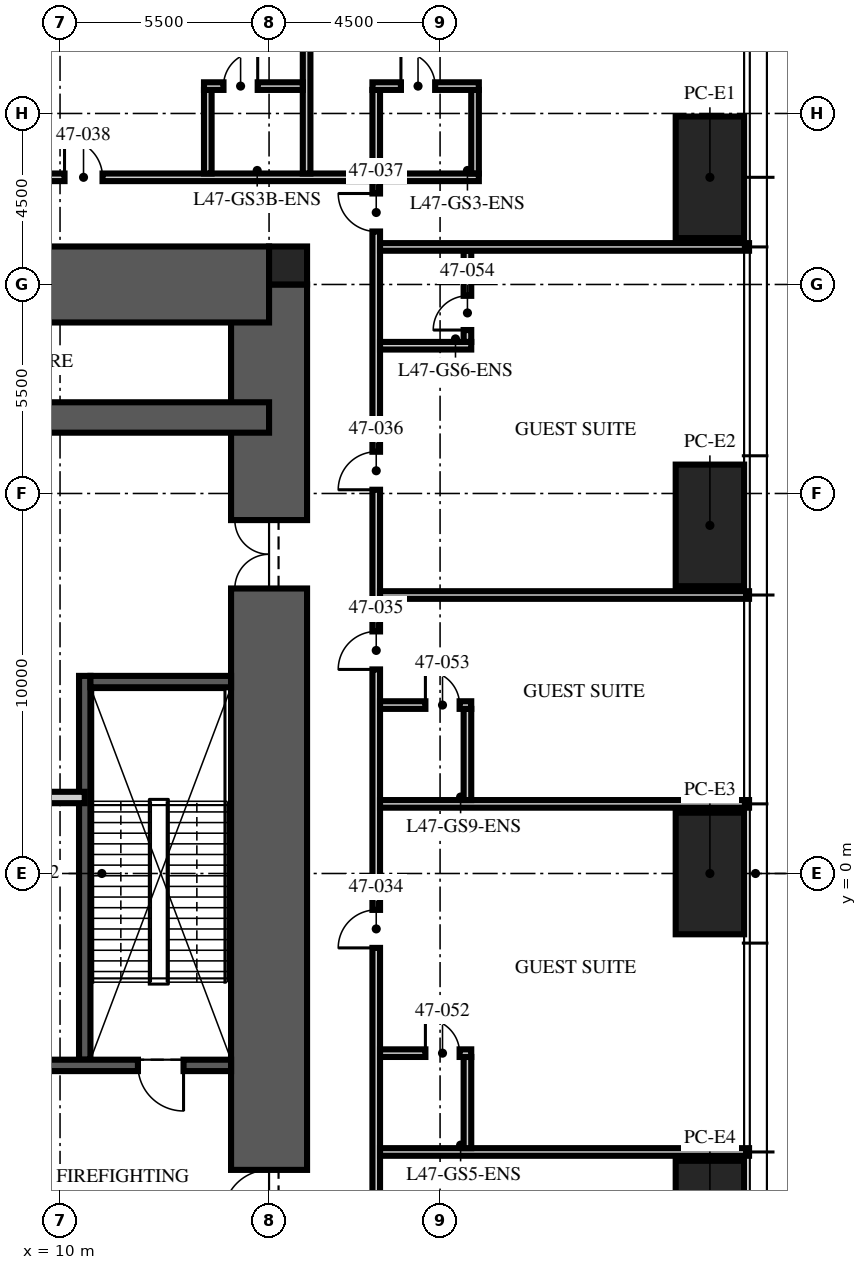
"""IFC4 building model, lengths in metres.
Left out: names, types, materials, properties, quantities, classifications, styles, units other than length and angle.
Written with IfcOpenShell. Run it as: python <this file> out.ifc"""

import sys

from ifc_helpers import new_model, si_unit, direction, frame, frame_2d, origin, origin_2d, place, context, subcontext, project, spatial, rectangle, hollow_rectangle, extrude, element, fill, save


model = new_model("IFC4")
c1 = context("Model", 3, precision=1e-05, world=origin(), true_north=direction((0.0, 1.0)))
c2 = subcontext(c1, "Body", "Model", "MODEL_VIEW")
j1 = project(units=[si_unit("LENGTHUNIT", "METRE"), si_unit("PLANEANGLEUNIT", "RADIAN")], contexts=[c1])
p1 = place(None, origin())
s1 = spatial("IfcSite", under=j1, at=p1, CompositionType="ELEMENT")
p2 = place(p1, origin())
s2 = spatial("IfcBuilding", under=s1, at=p2, CompositionType="ELEMENT")
p3 = place(p2, frame((0.0, 0.0, 186.0)))
s3 = spatial("IfcBuildingStorey", under=s2, at=p3, CompositionType="ELEMENT", Elevation=186.0)
p4 = place(p3, frame((15.5, -15.5, -0.3), z_axis=(0.0, 0.0, 1.0), x_axis=(0.0, 1.0, 0.0)))
e1 = element("IfcWall", 1, at=p4, inside=s3, PredefinedType="SHEAR", context=c2, shape_type="SweptSolid", body=[
    extrude(rectangle(XDim=31.0, YDim=2.0, at=frame_2d((15.5, 0.0))), origin(), (0.0, 0.0, 1.0), 5.95),
])
p5 = place(p4, frame((6.5, 0.0, 0.3)))
e2 = element("IfcOpeningElement", 2, at=p5, cuts=e1, PredefinedType="OPENING", context=c2, shape_type="SweptSolid", body=[
    extrude(rectangle(XDim=1.2, YDim=2.1, at=frame_2d((0.6, 1.05))), frame((0.0, 1.01, 0.0), z_axis=(0.0, -1.0, 0.0), x_axis=(1.0, 0.0, 0.0)), (0.0, 0.0, 1.0), 2.02),
])
p6 = place(p4, frame((23.0, 0.0, 0.3)))
e3 = element("IfcOpeningElement", 3, at=p6, cuts=e1, PredefinedType="OPENING", context=c2, shape_type="SweptSolid", body=[
    extrude(rectangle(XDim=1.8, YDim=2.1, at=frame_2d((0.9, 1.05))), frame((0.0, 1.01, 0.0), z_axis=(0.0, -1.0, 0.0), x_axis=(1.0, 0.0, 0.0)), (0.0, 0.0, 1.0), 2.02),
])
p7 = place(p3, frame((-15.5, 15.5, -0.3), z_axis=(0.0, 0.0, 1.0), x_axis=(1.0, 0.0, 0.0)))
e4 = element("IfcWall", 4, at=p7, inside=s3, PredefinedType="SHEAR", context=c2, shape_type="SweptSolid", body=[
    extrude(rectangle(XDim=31.0, YDim=2.0, at=frame_2d((15.5, 0.0))), origin(), (0.0, 0.0, 1.0), 5.95),
])
p8 = place(p7, frame((5.0, 0.0, 0.3)))
e5 = element("IfcOpeningElement", 5, at=p8, cuts=e4, PredefinedType="OPENING", context=c2, shape_type="SweptSolid", body=[
    extrude(rectangle(XDim=1.0, YDim=2.1, at=frame_2d((0.5, 1.05))), frame((0.0, 1.01, 0.0), z_axis=(0.0, -1.0, 0.0), x_axis=(1.0, 0.0, 0.0)), (0.0, 0.0, 1.0), 2.02),
])
p9 = place(p3, frame((-15.5, 12.0, -0.3), z_axis=(0.0, 0.0, 1.0), x_axis=(1.0, 0.0, 0.0)))
e6 = element("IfcWall", 6, at=p9, inside=s3, PredefinedType="SHEAR", context=c2, shape_type="SweptSolid", body=[
    extrude(rectangle(XDim=31.0, YDim=0.8, at=frame_2d((15.5, 0.0))), origin(), (0.0, 0.0, 1.0), 5.95),
])
p10 = place(p3, frame((16.0, 16.0, -0.3), z_axis=(0.0, 0.0, 1.0), x_axis=(1.0, 0.0, 0.0)))
e7 = element("IfcColumn", 7, at=p10, inside=s3, PredefinedType="COLUMN", context=c2, shape_type="SweptSolid", body=[
    extrude(rectangle(XDim=1.0, YDim=1.0, at=origin_2d()), origin(), (0.0, 0.0, 1.0), 5.95),
])
p11 = place(p3, frame((27.1, 18.32, 0.0), z_axis=(0.0, 0.0, 1.0), x_axis=(0.0, 1.0, 0.0)))
e8 = element("IfcColumn", 8, at=p11, inside=s3, PredefinedType="COLUMN", context=c2, shape_type="SweptSolid", body=[
    extrude(hollow_rectangle(XDim=3.2, YDim=1.8, WallThickness=0.2, at=origin_2d()), origin(), (0.0, 0.0, 1.0), 4.72),
])
p12 = place(p3, frame((27.1, 9.16, 0.0), z_axis=(0.0, 0.0, 1.0), x_axis=(0.0, 1.0, 0.0)))
e9 = element("IfcColumn", 9, at=p12, inside=s3, PredefinedType="COLUMN", context=c2, shape_type="SweptSolid", body=[
    extrude(hollow_rectangle(XDim=3.2, YDim=1.8, WallThickness=0.2, at=origin_2d()), origin(), (0.0, 0.0, 1.0), 4.87),
])
p13 = place(p3, frame((27.1, 0.0, 0.0), z_axis=(0.0, 0.0, 1.0), x_axis=(0.0, 1.0, 0.0)))
e10 = element("IfcColumn", 10, at=p13, inside=s3, PredefinedType="COLUMN", context=c2, shape_type="SweptSolid", body=[
    extrude(hollow_rectangle(XDim=3.2, YDim=1.8, WallThickness=0.2, at=origin_2d()), origin(), (0.0, 0.0, 1.0), 5.03),
])
p14 = place(p3, frame((27.1, -9.16, 0.0), z_axis=(0.0, 0.0, 1.0), x_axis=(0.0, 1.0, 0.0)))
e11 = element("IfcColumn", 11, at=p14, inside=s3, PredefinedType="COLUMN", context=c2, shape_type="SweptSolid", body=[
    extrude(hollow_rectangle(XDim=3.2, YDim=1.8, WallThickness=0.2, at=origin_2d()), origin(), (0.0, 0.0, 1.0), 4.87),
])
p15 = place(p3, frame((10.65, -4.9, 0.0), z_axis=(0.0, 0.0, 1.0), x_axis=(0.0, 1.0, 0.0)))
e12 = element("IfcWall", 12, at=p15, inside=s3, PredefinedType="SOLIDWALL", context=c2, shape_type="SweptSolid", body=[
    extrude(rectangle(XDim=10.1, YDim=0.3, at=frame_2d((5.05, 0.0))), origin(), (0.0, 0.0, 1.0), 5.65),
])
p16 = place(p3, frame((14.5, -5.05, 0.0), z_axis=(0.0, 0.0, 1.0), x_axis=(-1.0, 0.0, 0.0)))
e13 = element("IfcWall", 13, at=p16, inside=s3, PredefinedType="SOLIDWALL", context=c2, shape_type="SweptSolid", body=[
    extrude(rectangle(XDim=5.7, YDim=0.3, at=frame_2d((2.85, 0.0))), origin(), (0.0, 0.0, 1.0), 5.65),
])
p17 = place(p16, frame((1.25, 0.0, 0.0)))
e14 = element("IfcOpeningElement", 14, at=p17, cuts=e13, PredefinedType="OPENING", context=c2, shape_type="SweptSolid", body=[
    extrude(rectangle(XDim=1.2, YDim=2.1, at=frame_2d((0.6, 1.05))), frame((0.0, 0.16, 0.0), z_axis=(0.0, -1.0, 0.0), x_axis=(1.0, 0.0, 0.0)), (0.0, 0.0, 1.0), 0.32),
])
p18 = place(p3, frame((14.5, 5.05, 0.0), z_axis=(0.0, 0.0, 1.0), x_axis=(-1.0, 0.0, 0.0)))
e15 = element("IfcWall", 15, at=p18, inside=s3, PredefinedType="SOLIDWALL", context=c2, shape_type="SweptSolid", body=[
    extrude(rectangle(XDim=3.7, YDim=0.3, at=frame_2d((1.85, 0.0))), origin(), (0.0, 0.0, 1.0), 5.65),
])
p19 = place(p3, frame((-10.65, 2.0, 0.0), z_axis=(0.0, 0.0, 1.0), x_axis=(1.0, 0.0, 0.0)))
e16 = element("IfcWall", 16, at=p19, inside=s3, PredefinedType="PARTITIONING", context=c2, shape_type="SweptSolid", body=[
    extrude(rectangle(XDim=21.3, YDim=0.3, at=frame_2d((10.65, 0.0))), origin(), (0.0, 0.0, 1.0), 5.65),
])
p20 = place(p19, frame((10.05, 0.0, 0.0)))
e17 = element("IfcOpeningElement", 17, at=p20, cuts=e16, PredefinedType="OPENING", context=c2, shape_type="SweptSolid", body=[
    extrude(rectangle(XDim=1.2, YDim=2.1, at=frame_2d((0.6, 1.05))), frame((0.0, 0.16, 0.0), z_axis=(0.0, -1.0, 0.0), x_axis=(1.0, 0.0, 0.0)), (0.0, 0.0, 1.0), 0.32),
])
p21 = place(p19, frame((18.942, 0.0, 0.0)))
e18 = element("IfcOpeningElement", 18, at=p21, cuts=e16, PredefinedType="OPENING", context=c2, shape_type="SweptSolid", body=[
    extrude(rectangle(XDim=0.9, YDim=2.1, at=frame_2d((0.45, 1.05))), frame((0.0, 0.16, 0.0), z_axis=(0.0, -1.0, 0.0), x_axis=(1.0, 0.0, 0.0)), (0.0, 0.0, 1.0), 0.32),
])
p22 = place(p3, frame((18.32, -18.22, 0.0), z_axis=(0.0, 0.0, 1.0), x_axis=(0.0, 1.0, 0.0)))
e19 = element("IfcWall", 19, at=p22, inside=s3, PredefinedType="SOLIDWALL", context=c2, shape_type="SweptSolid", body=[
    extrude(rectangle(XDim=36.44, YDim=0.2, at=frame_2d((18.22, 0.0))), origin(), (0.0, 0.0, 1.0), 4.45),
])
p23 = place(p22, frame((7.102, 0.0, 0.0)))
e20 = element("IfcOpeningElement", 20, at=p23, cuts=e19, PredefinedType="OPENING", context=c2, shape_type="SweptSolid", body=[
    extrude(rectangle(XDim=1.0, YDim=2.1, at=frame_2d((0.5, 1.05))), frame((0.0, 0.11, 0.0), z_axis=(0.0, -1.0, 0.0), x_axis=(1.0, 0.0, 0.0)), (0.0, 0.0, 1.0), 0.22),
])
p24 = place(p22, frame((16.262, 0.0, 0.0)))
e21 = element("IfcOpeningElement", 21, at=p24, cuts=e19, PredefinedType="OPENING", context=c2, shape_type="SweptSolid", body=[
    extrude(rectangle(XDim=1.0, YDim=2.1, at=frame_2d((0.5, 1.05))), frame((0.0, 0.11, 0.0), z_axis=(0.0, -1.0, 0.0), x_axis=(1.0, 0.0, 0.0)), (0.0, 0.0, 1.0), 0.22),
])
p25 = place(p22, frame((23.59, 0.0, 0.0)))
e22 = element("IfcOpeningElement", 22, at=p25, cuts=e19, PredefinedType="OPENING", context=c2, shape_type="SweptSolid", body=[
    extrude(rectangle(XDim=1.0, YDim=2.1, at=frame_2d((0.5, 1.05))), frame((0.0, 0.11, 0.0), z_axis=(0.0, -1.0, 0.0), x_axis=(1.0, 0.0, 0.0)), (0.0, 0.0, 1.0), 0.22),
])
p26 = place(p22, frame((28.318, 0.0, 0.0)))
e23 = element("IfcOpeningElement", 23, at=p26, cuts=e19, PredefinedType="OPENING", context=c2, shape_type="SweptSolid", body=[
    extrude(rectangle(XDim=1.0, YDim=2.1, at=frame_2d((0.5, 1.05))), frame((0.0, 0.11, 0.0), z_axis=(0.0, -1.0, 0.0), x_axis=(1.0, 0.0, 0.0)), (0.0, 0.0, 1.0), 0.22),
])
p27 = place(p22, frame((35.114, 0.0, 0.0)))
e24 = element("IfcOpeningElement", 24, at=p27, cuts=e19, PredefinedType="OPENING", context=c2, shape_type="SweptSolid", body=[
    extrude(rectangle(XDim=1.0, YDim=2.1, at=frame_2d((0.5, 1.05))), frame((0.0, 0.11, 0.0), z_axis=(0.0, -1.0, 0.0), x_axis=(1.0, 0.0, 0.0)), (0.0, 0.0, 1.0), 0.22),
])
p28 = place(p3, frame((18.42, -7.328, 0.0), z_axis=(0.0, 0.0, 1.0), x_axis=(1.0, 0.0, 0.0)))
e25 = element("IfcWall", 25, at=p28, inside=s3, PredefinedType="SOLIDWALL", context=c2, shape_type="SweptSolid", body=[
    extrude(rectangle(XDim=9.71, YDim=0.2, at=frame_2d((4.855, 0.0))), origin(), (0.0, 0.0, 1.0), 4.95),
])
p29 = place(p3, frame((20.72, -7.228, 0.0), z_axis=(0.0, 0.0, 1.0), x_axis=(0.0, 1.0, 0.0)))
e26 = element("IfcWall", 26, at=p29, inside=s3, PredefinedType="SOLIDWALL", context=c2, shape_type="SweptSolid", body=[
    extrude(rectangle(XDim=2.4, YDim=0.2, at=frame_2d((1.2, 0.0))), origin(), (0.0, 0.0, 1.0), 5.65),
])
p30 = place(p3, frame((18.42, -4.728, 0.0), z_axis=(0.0, 0.0, 1.0), x_axis=(1.0, 0.0, 0.0)))
e27 = element("IfcWall", 27, at=p30, inside=s3, PredefinedType="SOLIDWALL", context=c2, shape_type="SweptSolid", body=[
    extrude(rectangle(XDim=2.4, YDim=0.2, at=frame_2d((1.2, 0.0))), origin(), (0.0, 0.0, 1.0), 4.45),
])
p31 = place(p30, frame((1.194, 0.0, 0.0)))
e28 = element("IfcOpeningElement", 28, at=p31, cuts=e27, PredefinedType="OPENING", context=c2, shape_type="SweptSolid", body=[
    extrude(rectangle(XDim=0.9, YDim=2.1, at=frame_2d((0.45, 1.05))), frame((0.0, 0.11, 0.0), z_axis=(0.0, -1.0, 0.0), x_axis=(1.0, 0.0, 0.0)), (0.0, 0.0, 1.0), 0.22),
])
p32 = place(p3, frame((18.42, 1.832, 0.0), z_axis=(0.0, 0.0, 1.0), x_axis=(1.0, 0.0, 0.0)))
e29 = element("IfcWall", 29, at=p32, inside=s3, PredefinedType="SOLIDWALL", context=c2, shape_type="SweptSolid", body=[
    extrude(rectangle(XDim=9.71, YDim=0.2, at=frame_2d((4.855, 0.0))), origin(), (0.0, 0.0, 1.0), 4.95),
])
p33 = place(p3, frame((20.72, 1.932, 0.0), z_axis=(0.0, 0.0, 1.0), x_axis=(0.0, 1.0, 0.0)))
e30 = element("IfcWall", 30, at=p33, inside=s3, PredefinedType="SOLIDWALL", context=c2, shape_type="SweptSolid", body=[
    extrude(rectangle(XDim=2.4, YDim=0.2, at=frame_2d((1.2, 0.0))), origin(), (0.0, 0.0, 1.0), 5.65),
])
p34 = place(p3, frame((18.42, 4.432, 0.0), z_axis=(0.0, 0.0, 1.0), x_axis=(1.0, 0.0, 0.0)))
e31 = element("IfcWall", 31, at=p34, inside=s3, PredefinedType="SOLIDWALL", context=c2, shape_type="SweptSolid", body=[
    extrude(rectangle(XDim=2.4, YDim=0.2, at=frame_2d((1.2, 0.0))), origin(), (0.0, 0.0, 1.0), 4.45),
])
p35 = place(p34, frame((1.194, 0.0, 0.0)))
e32 = element("IfcOpeningElement", 32, at=p35, cuts=e31, PredefinedType="OPENING", context=c2, shape_type="SweptSolid", body=[
    extrude(rectangle(XDim=0.9, YDim=2.1, at=frame_2d((0.45, 1.05))), frame((0.0, 0.11, 0.0), z_axis=(0.0, -1.0, 0.0), x_axis=(1.0, 0.0, 0.0)), (0.0, 0.0, 1.0), 0.22),
])
p36 = place(p3, frame((18.42, 7.328, 0.0), z_axis=(0.0, 0.0, 1.0), x_axis=(1.0, 0.0, 0.0)))
e33 = element("IfcWall", 33, at=p36, inside=s3, PredefinedType="SOLIDWALL", context=c2, shape_type="SweptSolid", body=[
    extrude(rectangle(XDim=9.71, YDim=0.2, at=frame_2d((4.855, 0.0))), origin(), (0.0, 0.0, 1.0), 4.95),
])
p37 = place(p3, frame((18.42, 13.888, 0.0), z_axis=(0.0, 0.0, 1.0), x_axis=(1.0, 0.0, 0.0)))
e34 = element("IfcWall", 34, at=p37, inside=s3, PredefinedType="SOLIDWALL", context=c2, shape_type="SweptSolid", body=[
    extrude(rectangle(XDim=2.4, YDim=0.2, at=frame_2d((1.2, 0.0))), origin(), (0.0, 0.0, 1.0), 4.45),
])
p38 = place(p3, frame((20.72, 13.988, 0.0), z_axis=(0.0, 0.0, 1.0), x_axis=(0.0, 1.0, 0.0)))
e35 = element("IfcWall", 35, at=p38, inside=s3, PredefinedType="SOLIDWALL", context=c2, shape_type="SweptSolid", body=[
    extrude(rectangle(XDim=2.4, YDim=0.2, at=frame_2d((1.2, 0.0))), origin(), (0.0, 0.0, 1.0), 5.65),
])
p39 = place(p38, frame((0.313, 0.0, 0.0)))
e36 = element("IfcOpeningElement", 36, at=p39, cuts=e35, PredefinedType="OPENING", context=c2, shape_type="SweptSolid", body=[
    extrude(rectangle(XDim=0.9, YDim=2.1, at=frame_2d((0.45, 1.05))), frame((0.0, 0.11, 0.0), z_axis=(0.0, -1.0, 0.0), x_axis=(1.0, 0.0, 0.0)), (0.0, 0.0, 1.0), 0.22),
])
p40 = place(p3, frame((18.42, 16.488, 0.0), z_axis=(0.0, 0.0, 1.0), x_axis=(1.0, 0.0, 0.0)))
e37 = element("IfcWall", 37, at=p40, inside=s3, PredefinedType="SOLIDWALL", context=c2, shape_type="SweptSolid", body=[
    extrude(rectangle(XDim=9.71, YDim=0.2, at=frame_2d((4.855, 0.0))), origin(), (0.0, 0.0, 1.0), 4.95),
])
p41 = place(p3, frame((1.732, 18.32, 0.0), z_axis=(0.0, 0.0, 1.0), x_axis=(1.0, 0.0, 0.0)))
e38 = element("IfcWall", 38, at=p41, inside=s3, PredefinedType="SOLIDWALL", context=c2, shape_type="SweptSolid", body=[
    extrude(rectangle(XDim=19.288, YDim=0.2, at=frame_2d((9.644, 0.0))), origin(), (0.0, 0.0, 1.0), 4.45),
])
p42 = place(p41, frame((8.386, 0.0, 0.0)))
e39 = element("IfcOpeningElement", 39, at=p42, cuts=e38, PredefinedType="OPENING", context=c2, shape_type="SweptSolid", body=[
    extrude(rectangle(XDim=1.0, YDim=2.1, at=frame_2d((0.5, 1.05))), frame((0.0, 0.11, 0.0), z_axis=(0.0, -1.0, 0.0), x_axis=(1.0, 0.0, 0.0)), (0.0, 0.0, 1.0), 0.22),
])
p43 = place(p3, frame((13.888, 18.42, 0.0), z_axis=(0.0, 0.0, 1.0), x_axis=(0.0, 1.0, 0.0)))
e40 = element("IfcWall", 40, at=p43, inside=s3, PredefinedType="SOLIDWALL", context=c2, shape_type="SweptSolid", body=[
    extrude(rectangle(XDim=2.2, YDim=0.2, at=frame_2d((1.1, 0.0))), origin(), (0.0, 0.0, 1.0), 4.45),
])
p44 = place(p3, frame((16.488, 18.42, 0.0), z_axis=(0.0, 0.0, 1.0), x_axis=(0.0, 1.0, 0.0)))
e41 = element("IfcWall", 41, at=p44, inside=s3, PredefinedType="SOLIDWALL", context=c2, shape_type="SweptSolid", body=[
    extrude(rectangle(XDim=9.71, YDim=0.2, at=frame_2d((4.855, 0.0))), origin(), (0.0, 0.0, 1.0), 4.95),
])
for number, where, z_axis, x_axis in (
    (42, (18.32, 18.42, 0.0), (0.0, 0.0, 1.0), (0.0, 1.0, 0.0)),
    (43, (20.92, 18.42, 0.0), (0.0, 0.0, 1.0), (0.0, 1.0, 0.0)),
):
    element("IfcWall", number, at=place(p3, frame(where, z_axis=z_axis, x_axis=x_axis)), inside=s3, PredefinedType="SOLIDWALL", context=c2, shape_type="SweptSolid", body=[
        extrude(rectangle(XDim=2.2, YDim=0.2, at=frame_2d((1.1, 0.0))), origin(), (0.0, 0.0, 1.0), 4.45),
    ])
p45 = place(p3, frame((13.788, 20.72, 0.0), z_axis=(0.0, 0.0, 1.0), x_axis=(1.0, 0.0, 0.0)))
e44 = element("IfcWall", 44, at=p45, inside=s3, PredefinedType="SOLIDWALL", context=c2, shape_type="SweptSolid", body=[
    extrude(rectangle(XDim=2.6, YDim=0.2, at=frame_2d((1.3, 0.0))), origin(), (0.0, 0.0, 1.0), 4.45),
])
p46 = place(p45, frame((0.513, 0.0, 0.0)))
e45 = element("IfcOpeningElement", 45, at=p46, cuts=e44, PredefinedType="OPENING", context=c2, shape_type="SweptSolid", body=[
    extrude(rectangle(XDim=0.9, YDim=2.1, at=frame_2d((0.45, 1.05))), frame((0.0, 0.11, 0.0), z_axis=(0.0, -1.0, 0.0), x_axis=(1.0, 0.0, 0.0)), (0.0, 0.0, 1.0), 0.22),
])
p47 = place(p3, frame((18.22, 20.72, 0.0), z_axis=(0.0, 0.0, 1.0), x_axis=(1.0, 0.0, 0.0)))
e46 = element("IfcWall", 46, at=p47, inside=s3, PredefinedType="SOLIDWALL", context=c2, shape_type="SweptSolid", body=[
    extrude(rectangle(XDim=2.8, YDim=0.2, at=frame_2d((1.4, 0.0))), origin(), (0.0, 0.0, 1.0), 4.45),
])
p48 = place(p47, frame((0.75, 0.0, 0.0)))
e47 = element("IfcOpeningElement", 47, at=p48, cuts=e46, PredefinedType="OPENING", context=c2, shape_type="SweptSolid", body=[
    extrude(rectangle(XDim=0.9, YDim=2.1, at=frame_2d((0.45, 1.05))), frame((0.0, 0.11, 0.0), z_axis=(0.0, -1.0, 0.0), x_axis=(1.0, 0.0, 0.0)), (0.0, 0.0, 1.0), 0.22),
])
p49 = place(p17, origin())
e48 = element("IfcDoor", 48, at=p49, inside=s3, OperationType="SINGLE_SWING_LEFT", PredefinedType="DOOR", context=c2, shape_type="SweptSolid", body=[
    extrude(rectangle(XDim=1.2, YDim=2.1, at=frame_2d((0.6, 1.05))), frame((0.0, 0.025, 0.0), z_axis=(0.0, -1.0, 0.0), x_axis=(1.0, 0.0, 0.0)), (0.0, 0.0, 1.0), 0.05),
])
fill(e14, e48)
p50 = place(p5, origin())
e49 = element("IfcDoor", 49, at=p50, inside=s3, OperationType="SINGLE_SWING_LEFT", PredefinedType="DOOR", context=c2, shape_type="SweptSolid", body=[
    extrude(rectangle(XDim=1.2, YDim=2.1, at=frame_2d((0.6, 1.05))), frame((0.0, 0.025, 0.0), z_axis=(0.0, -1.0, 0.0), x_axis=(1.0, 0.0, 0.0)), (0.0, 0.0, 1.0), 0.05),
])
fill(e2, e49)
p51 = place(p6, origin())
e50 = element("IfcDoor", 50, at=p51, inside=s3, OperationType="DOUBLE_DOOR_SINGLE_SWING", PredefinedType="DOOR", context=c2, shape_type="SweptSolid", body=[
    extrude(rectangle(XDim=1.8, YDim=2.1, at=frame_2d((0.9, 1.05))), frame((0.0, 0.025, 0.0), z_axis=(0.0, -1.0, 0.0), x_axis=(1.0, 0.0, 0.0)), (0.0, 0.0, 1.0), 0.05),
])
fill(e3, e50)
p52 = place(p24, origin())
e51 = element("IfcDoor", 51, at=p52, inside=s3, OperationType="SINGLE_SWING_LEFT", PredefinedType="DOOR", context=c2, shape_type="SweptSolid", body=[
    extrude(rectangle(XDim=1.0, YDim=2.1, at=frame_2d((0.5, 1.05))), frame((0.0, 0.025, 0.0), z_axis=(0.0, -1.0, 0.0), x_axis=(1.0, 0.0, 0.0)), (0.0, 0.0, 1.0), 0.05),
])
fill(e21, e51)
p53 = place(p25, origin())
e52 = element("IfcDoor", 52, at=p53, inside=s3, OperationType="SINGLE_SWING_LEFT", PredefinedType="DOOR", context=c2, shape_type="SweptSolid", body=[
    extrude(rectangle(XDim=1.0, YDim=2.1, at=frame_2d((0.5, 1.05))), frame((0.0, 0.025, 0.0), z_axis=(0.0, -1.0, 0.0), x_axis=(1.0, 0.0, 0.0)), (0.0, 0.0, 1.0), 0.05),
])
fill(e22, e52)
p54 = place(p26, origin())
e53 = element("IfcDoor", 53, at=p54, inside=s3, OperationType="SINGLE_SWING_LEFT", PredefinedType="DOOR", context=c2, shape_type="SweptSolid", body=[
    extrude(rectangle(XDim=1.0, YDim=2.1, at=frame_2d((0.5, 1.05))), frame((0.0, 0.025, 0.0), z_axis=(0.0, -1.0, 0.0), x_axis=(1.0, 0.0, 0.0)), (0.0, 0.0, 1.0), 0.05),
])
fill(e23, e53)
p55 = place(p27, origin())
e54 = element("IfcDoor", 54, at=p55, inside=s3, OperationType="SINGLE_SWING_RIGHT", PredefinedType="DOOR", context=c2, shape_type="SweptSolid", body=[
    extrude(rectangle(XDim=1.0, YDim=2.1, at=frame_2d((0.5, 1.05))), frame((0.0, 0.025, 0.0), z_axis=(0.0, -1.0, 0.0), x_axis=(1.0, 0.0, 0.0)), (0.0, 0.0, 1.0), 0.05),
])
fill(e24, e54)
p56 = place(p42, origin())
e55 = element("IfcDoor", 55, at=p56, inside=s3, OperationType="SINGLE_SWING_LEFT", PredefinedType="DOOR", context=c2, shape_type="SweptSolid", body=[
    extrude(rectangle(XDim=1.0, YDim=2.1, at=frame_2d((0.5, 1.05))), frame((0.0, 0.025, 0.0), z_axis=(0.0, -1.0, 0.0), x_axis=(1.0, 0.0, 0.0)), (0.0, 0.0, 1.0), 0.05),
])
fill(e39, e55)
p57 = place(p31, origin())
e56 = element("IfcDoor", 56, at=p57, inside=s3, OperationType="SINGLE_SWING_LEFT", PredefinedType="DOOR", context=c2, shape_type="SweptSolid", body=[
    extrude(rectangle(XDim=0.9, YDim=2.1, at=frame_2d((0.45, 1.05))), frame((0.0, 0.025, 0.0), z_axis=(0.0, -1.0, 0.0), x_axis=(1.0, 0.0, 0.0)), (0.0, 0.0, 1.0), 0.05),
])
fill(e28, e56)
p58 = place(p35, origin())
e57 = element("IfcDoor", 57, at=p58, inside=s3, OperationType="SINGLE_SWING_LEFT", PredefinedType="DOOR", context=c2, shape_type="SweptSolid", body=[
    extrude(rectangle(XDim=0.9, YDim=2.1, at=frame_2d((0.45, 1.05))), frame((0.0, 0.025, 0.0), z_axis=(0.0, -1.0, 0.0), x_axis=(1.0, 0.0, 0.0)), (0.0, 0.0, 1.0), 0.05),
])
fill(e32, e57)
p59 = place(p39, origin())
e58 = element("IfcDoor", 58, at=p59, inside=s3, OperationType="SINGLE_SWING_LEFT", PredefinedType="DOOR", context=c2, shape_type="SweptSolid", body=[
    extrude(rectangle(XDim=0.9, YDim=2.1, at=frame_2d((0.45, 1.05))), frame((0.0, 0.025, 0.0), z_axis=(0.0, -1.0, 0.0), x_axis=(1.0, 0.0, 0.0)), (0.0, 0.0, 1.0), 0.05),
])
fill(e36, e58)
p60 = place(p48, origin())
e59 = element("IfcDoor", 59, at=p60, inside=s3, OperationType="SINGLE_SWING_LEFT", PredefinedType="DOOR", context=c2, shape_type="SweptSolid", body=[
    extrude(rectangle(XDim=0.9, YDim=2.1, at=frame_2d((0.45, 1.05))), frame((0.0, 0.025, 0.0), z_axis=(0.0, -1.0, 0.0), x_axis=(1.0, 0.0, 0.0)), (0.0, 0.0, 1.0), 0.05),
])
fill(e47, e59)
p61 = place(p46, origin())
e60 = element("IfcDoor", 60, at=p61, inside=s3, OperationType="SINGLE_SWING_RIGHT", PredefinedType="DOOR", context=c2, shape_type="SweptSolid", body=[
    extrude(rectangle(XDim=0.9, YDim=2.1, at=frame_2d((0.45, 1.05))), frame((0.0, 0.025, 0.0), z_axis=(0.0, -1.0, 0.0), x_axis=(1.0, 0.0, 0.0)), (0.0, 0.0, 1.0), 0.05),
])
fill(e45, e60)
save(model, sys.argv[1])
